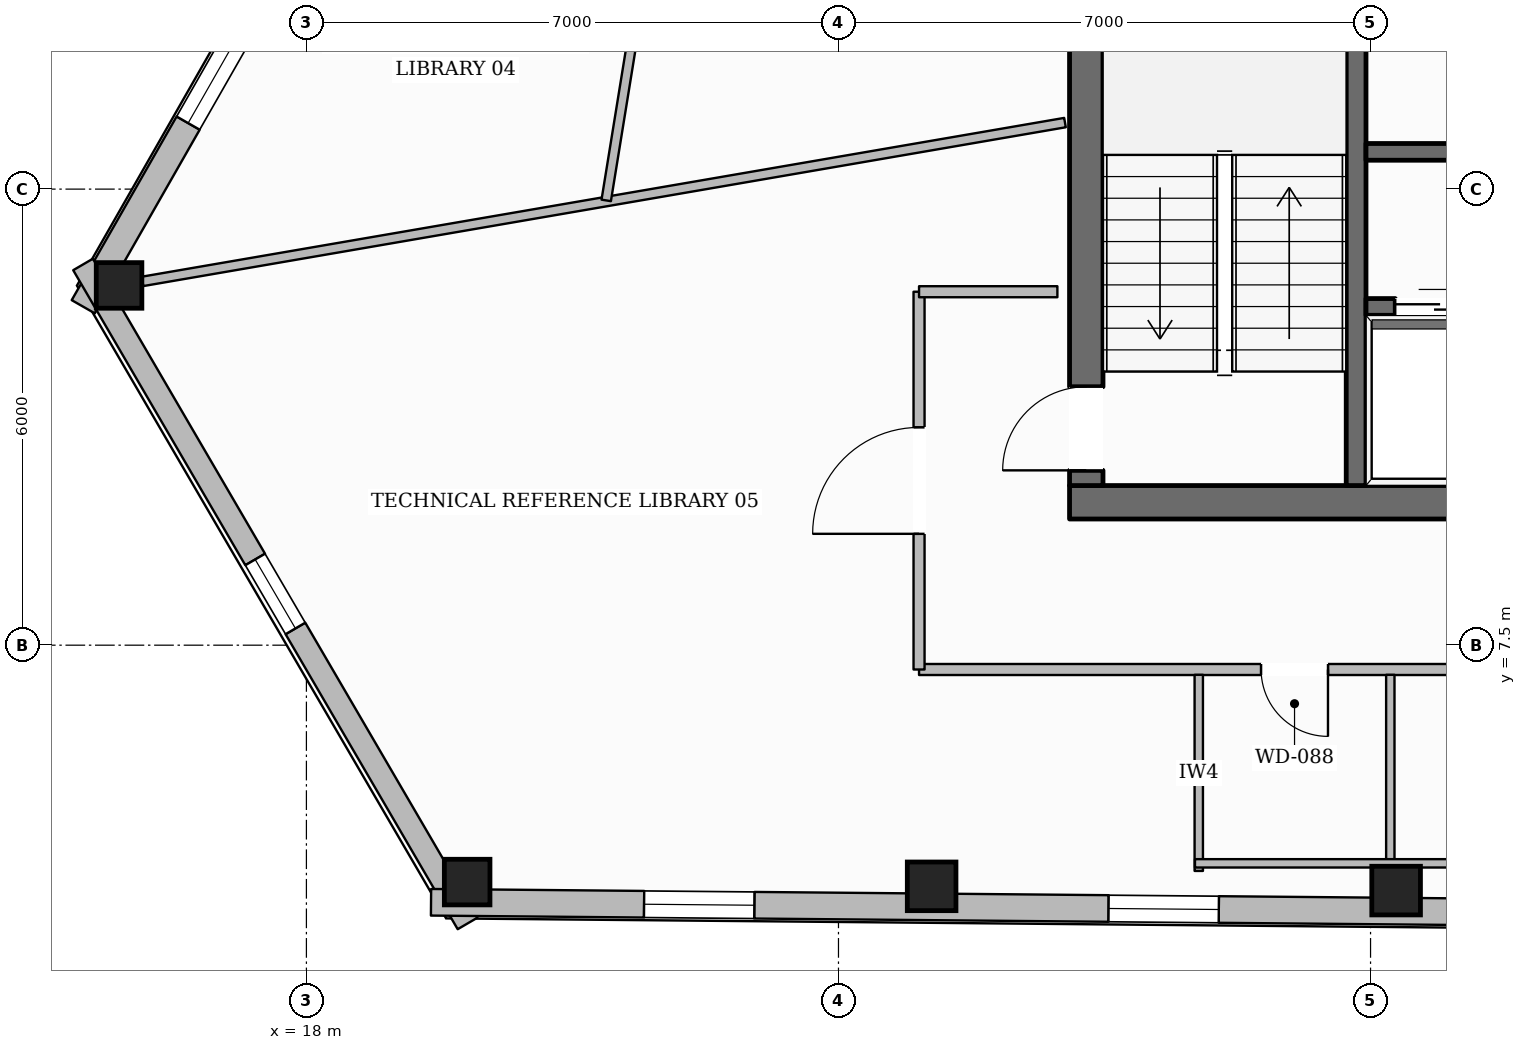
"""IFC4 building model, lengths in metres.
Left out: names, types, materials, properties, quantities, classifications, styles, units other than length and angle.
Written with IfcOpenShell. Run it as: python <this file> out.ifc"""

import sys

from ifc_helpers import new_model, si_unit, direction, frame, frame_2d, origin, origin_2d, place, context, subcontext, project, spatial, rectangle, hollow_rectangle, extrude, element, fill, save


model = new_model("IFC4")
c1 = context("Model", 3, precision=1e-05, world=origin(), true_north=direction((0.0, 1.0)))
c2 = subcontext(c1, "Body", "Model", "MODEL_VIEW")
j1 = project(units=[si_unit("LENGTHUNIT", "METRE"), si_unit("PLANEANGLEUNIT", "RADIAN")], contexts=[c1])
p1 = place(None, origin())
s1 = spatial("IfcSite", under=j1, at=p1, CompositionType="ELEMENT")
p2 = place(p1, origin())
s2 = spatial("IfcBuilding", under=s1, at=p2, CompositionType="ELEMENT")
p3 = place(p2, frame((0.0, 0.0, 188.1)))
s3 = spatial("IfcBuildingStorey", under=s2, at=p3, CompositionType="ELEMENT", Elevation=188.1)
p4 = place(p3, frame((28.04, 9.38, 0.0), z_axis=(0.0, 0.0, 1.0), x_axis=(1.0, 0.0, 0.0)))
e1 = element("IfcWall", 1, at=p4, inside=s3, PredefinedType="SOLIDWALL", context=c2, shape_type="SweptSolid", body=[
    extrude(rectangle(XDim=19.92, YDim=0.44, at=frame_2d((9.96, 0.0))), origin(), (0.0, 0.0, 1.0), 3.6),
])
p5 = place(p4, frame((10.46, 0.0, 0.0)))
e2 = element("IfcOpeningElement", 2, at=p5, cuts=e1, PredefinedType="OPENING", context=c2, shape_type="SweptSolid", body=[
    extrude(rectangle(XDim=1.4, YDim=2.2, at=frame_2d((0.7, 1.1))), frame((0.0, 0.23, 0.0), z_axis=(0.0, -1.0, 0.0), x_axis=(1.0, 0.0, 0.0)), (0.0, 0.0, 1.0), 0.46),
])
p6 = place(p3, frame((28.26, 9.6, 0.0), z_axis=(0.0, 0.0, 1.0), x_axis=(0.0, 1.0, 0.0)))
e3 = element("IfcWall", 3, at=p6, inside=s3, PredefinedType="SOLIDWALL", context=c2, shape_type="SweptSolid", body=[
    extrude(rectangle(XDim=13.0, YDim=0.44, at=frame_2d((6.5, 0.0))), origin(), (0.0, 0.0, 1.0), 3.6),
])
p7 = place(p6, frame((0.2, 0.0, 0.0)))
e4 = element("IfcOpeningElement", 4, at=p7, cuts=e3, PredefinedType="OPENING", context=c2, shape_type="SweptSolid", body=[
    extrude(rectangle(XDim=1.1, YDim=2.15, at=frame_2d((0.55, 1.075))), frame((0.0, 0.23, 0.0), z_axis=(0.0, -1.0, 0.0), x_axis=(1.0, 0.0, 0.0)), (0.0, 0.0, 1.0), 0.46),
])
p8 = place(p6, frame((8.4, 0.0, 0.0)))
e5 = element("IfcOpeningElement", 5, at=p8, cuts=e3, PredefinedType="OPENING", context=c2, shape_type="SweptSolid", body=[
    extrude(rectangle(XDim=0.9, YDim=2.1, at=frame_2d((0.45, 1.05))), frame((0.0, 0.23, 0.0), z_axis=(0.0, -1.0, 0.0), x_axis=(1.0, 0.0, 0.0)), (0.0, 0.0, 1.0), 0.46),
])
p9 = place(p3, frame((31.81, 9.6, 0.0), z_axis=(0.0, 0.0, 1.0), x_axis=(0.0, 1.0, 0.0)))
e6 = element("IfcWall", 6, at=p9, inside=s3, PredefinedType="SHEAR", context=c2, shape_type="SweptSolid", body=[
    extrude(rectangle(XDim=13.0, YDim=0.26, at=frame_2d((6.5, 0.0))), origin(), (0.0, 0.0, 1.0), 3.6),
])
p10 = place(p9, frame((10.925, 0.0, 0.0)))
e7 = element("IfcOpeningElement", 7, at=p10, cuts=e6, PredefinedType="OPENING", context=c2, shape_type="SweptSolid", body=[
    extrude(rectangle(XDim=1.25, YDim=2.25, at=frame_2d((0.625, 1.125))), frame((0.0, 0.14, 0.0), z_axis=(0.0, -1.0, 0.0), x_axis=(1.0, 0.0, 0.0)), (0.0, 0.0, 1.0), 0.28),
])
p11 = place(p3, frame((31.94, 13.99, 0.0), z_axis=(0.0, 0.0, 1.0), x_axis=(1.0, 0.0, 0.0)))
e8 = element("IfcWall", 8, at=p11, inside=s3, PredefinedType="SOLIDWALL", context=c2, shape_type="SweptSolid", body=[
    extrude(rectangle(XDim=12.12, YDim=0.22, at=frame_2d((6.06, 0.0))), origin(), (0.0, 0.0, 1.0), 3.6),
])
p12 = place(p11, frame((3.11, 0.0, 0.0)))
e9 = element("IfcOpeningElement", 9, at=p12, cuts=e8, PredefinedType="OPENING", context=c2, shape_type="SweptSolid", body=[
    extrude(rectangle(XDim=0.9, YDim=2.1, at=frame_2d((0.45, 1.05))), frame((0.0, 0.12, 0.0), z_axis=(0.0, -1.0, 0.0), x_axis=(1.0, 0.0, 0.0)), (0.0, 0.0, 1.0), 0.24),
])
p13 = place(p11, frame((9.21, 0.0, 0.0)))
e10 = element("IfcOpeningElement", 10, at=p13, cuts=e8, PredefinedType="OPENING", context=c2, shape_type="SweptSolid", body=[
    extrude(rectangle(XDim=0.9, YDim=2.1, at=frame_2d((0.45, 1.05))), frame((0.0, 0.12, 0.0), z_axis=(0.0, -1.0, 0.0), x_axis=(1.0, 0.0, 0.0)), (0.0, 0.0, 1.0), 0.24),
])
p14 = place(p3, frame((31.94, 11.95, 0.0), z_axis=(0.0, 0.0, 1.0), x_axis=(1.0, 0.0, 0.0)))
e11 = element("IfcWall", 11, at=p14, inside=s3, PredefinedType="SOLIDWALL", context=c2, shape_type="SweptSolid", body=[
    extrude(rectangle(XDim=6.19, YDim=0.22, at=frame_2d((3.095, 0.0))), origin(), (0.0, 0.0, 1.0), 3.6),
])
p15 = place(p14, frame((0.385, 0.0, 0.0)))
e12 = element("IfcOpeningElement", 12, at=p15, cuts=e11, PredefinedType="OPENING", context=c2, shape_type="SweptSolid", body=[
    extrude(rectangle(XDim=1.1, YDim=2.2, at=frame_2d((0.55, 1.1))), frame((0.0, 0.12, 0.0), z_axis=(0.0, -1.0, 0.0), x_axis=(1.0, 0.0, 0.0)), (0.0, 0.0, 1.0), 0.24),
])
p16 = place(p14, frame((2.435, 0.0, 0.0)))
e13 = element("IfcOpeningElement", 13, at=p16, cuts=e11, PredefinedType="OPENING", context=c2, shape_type="SweptSolid", body=[
    extrude(rectangle(XDim=1.1, YDim=2.2, at=frame_2d((0.55, 1.1))), frame((0.0, 0.12, 0.0), z_axis=(0.0, -1.0, 0.0), x_axis=(1.0, 0.0, 0.0)), (0.0, 0.0, 1.0), 0.24),
])
p17 = place(p14, frame((4.485, 0.0, 0.0)))
e14 = element("IfcOpeningElement", 14, at=p17, cuts=e11, PredefinedType="OPENING", context=c2, shape_type="SweptSolid", body=[
    extrude(rectangle(XDim=1.1, YDim=2.2, at=frame_2d((0.55, 1.1))), frame((0.0, 0.12, 0.0), z_axis=(0.0, -1.0, 0.0), x_axis=(1.0, 0.0, 0.0)), (0.0, 0.0, 1.0), 0.24),
])
for number, where, z_axis, x_axis in (
    (15, (15.535, 12.233, 0.0), (0.0, 0.0, 1.0), (1.0, 0.0, 0.0)),
    (16, (20.115, 4.383, 0.0), (0.0, 0.0, 1.0), (1.0, 0.0, 0.0)),
):
    element("IfcColumn", number, at=place(p3, frame(where, z_axis=z_axis, x_axis=x_axis)), inside=s3, PredefinedType="COLUMN", context=c2, shape_type="SweptSolid", body=[
        extrude(hollow_rectangle(XDim=0.6, YDim=0.6, WallThickness=0.028, at=origin_2d()), origin(), (0.0, 0.0, 1.0), 3.6),
    ])
for number, where, z_axis, x_axis in (
    (17, (26.226, 4.327, 0.0), (0.0, 0.0, 1.0), (1.0, 0.0, 0.0)),
    (18, (32.336, 4.271, 0.0), (0.0, 0.0, 1.0), (1.0, 0.0, 0.0)),
):
    element("IfcColumn", number, at=place(p3, frame(where, z_axis=z_axis, x_axis=x_axis)), inside=s3, PredefinedType="COLUMN", context=c2, shape_type="SweptSolid", body=[
        extrude(hollow_rectangle(XDim=0.64, YDim=0.64, WallThickness=0.028, at=origin_2d()), origin(), (0.0, 0.0, 1.0), 3.6),
    ])
p18 = place(p3, frame((15.064, 11.953, 0.0), z_axis=(0.0, 0.0, 1.0), x_axis=(0.495993114815, 0.86832645362, 0.0)))
e19 = element("IfcWall", 19, at=p18, inside=s3, PredefinedType="STANDARD", context=c2, shape_type="SweptSolid", body=[
    extrude(rectangle(XDim=37.324, YDim=0.35, at=frame_2d((18.662, 0.0))), origin(), (0.0, 0.0, 1.0), 3.132),
])
p19 = place(p18, frame((33.087, 0.0, 0.65)))
e20 = element("IfcOpeningElement", 20, at=p19, cuts=e19, PredefinedType="OPENING", context=c2, shape_type="SweptSolid", body=[
    extrude(rectangle(XDim=1.45, YDim=1.75, at=frame_2d((0.725, 0.875))), frame((0.0, 0.185, 0.0), z_axis=(0.0, -1.0, 0.0), x_axis=(1.0, 0.0, 0.0)), (0.0, 0.0, 1.0), 0.37),
])
p20 = place(p18, frame((27.026, 0.0, 0.65)))
e21 = element("IfcOpeningElement", 21, at=p20, cuts=e19, PredefinedType="OPENING", context=c2, shape_type="SweptSolid", body=[
    extrude(rectangle(XDim=1.45, YDim=1.75, at=frame_2d((0.725, 0.875))), frame((0.0, 0.185, 0.0), z_axis=(0.0, -1.0, 0.0), x_axis=(1.0, 0.0, 0.0)), (0.0, 0.0, 1.0), 0.37),
])
p21 = place(p18, frame((14.904, 0.0, 0.65)))
e22 = element("IfcOpeningElement", 22, at=p21, cuts=e19, PredefinedType="OPENING", context=c2, shape_type="SweptSolid", body=[
    extrude(rectangle(XDim=1.45, YDim=1.75, at=frame_2d((0.725, 0.875))), frame((0.0, 0.185, 0.0), z_axis=(0.0, -1.0, 0.0), x_axis=(1.0, 0.0, 0.0)), (0.0, 0.0, 1.0), 0.37),
])
p22 = place(p18, frame((8.844, 0.0, 0.65)))
e23 = element("IfcOpeningElement", 23, at=p22, cuts=e19, PredefinedType="OPENING", context=c2, shape_type="SweptSolid", body=[
    extrude(rectangle(XDim=1.45, YDim=1.75, at=frame_2d((0.725, 0.875))), frame((0.0, 0.185, 0.0), z_axis=(0.0, -1.0, 0.0), x_axis=(1.0, 0.0, 0.0)), (0.0, 0.0, 1.0), 0.37),
])
p23 = place(p18, frame((2.782, 0.0, 0.65)))
e24 = element("IfcOpeningElement", 24, at=p23, cuts=e19, PredefinedType="OPENING", context=c2, shape_type="SweptSolid", body=[
    extrude(rectangle(XDim=1.45, YDim=1.75, at=frame_2d((0.725, 0.875))), frame((0.0, 0.185, 0.0), z_axis=(0.0, -1.0, 0.0), x_axis=(1.0, 0.0, 0.0)), (0.0, 0.0, 1.0), 0.37),
])
p24 = place(p3, frame((20.12, 3.839, 0.0), z_axis=(0.0, 0.0, 1.0), x_axis=(-0.503937564299, 0.863740083178, 0.0)))
e25 = element("IfcWall", 25, at=p24, inside=s3, PredefinedType="STANDARD", context=c2, shape_type="SweptSolid", body=[
    extrude(rectangle(XDim=10.038, YDim=0.3, at=frame_2d((5.019, 0.0))), origin(), (0.0, 0.0, 1.0), 3.132),
])
p25 = place(p24, frame((4.494, 0.0, 0.65)))
e26 = element("IfcOpeningElement", 26, at=p25, cuts=e25, PredefinedType="OPENING", context=c2, shape_type="SweptSolid", body=[
    extrude(rectangle(XDim=1.05, YDim=1.7, at=frame_2d((0.525, 0.85))), frame((0.0, 0.16, 0.0), z_axis=(0.0, -1.0, 0.0), x_axis=(1.0, 0.0, 0.0)), (0.0, 0.0, 1.0), 0.32),
])
p26 = place(p3, frame((57.259, 3.773, 0.0), z_axis=(0.0, 0.0, 1.0), x_axis=(-0.999958016909, 0.009163210113, 0.0)))
e27 = element("IfcWall", 27, at=p26, inside=s3, PredefinedType="STANDARD", context=c2, shape_type="SweptSolid", body=[
    extrude(rectangle(XDim=37.621, YDim=0.35, at=frame_2d((18.81, 0.0))), origin(), (0.0, 0.0, 1.0), 3.132),
])
p27 = place(p26, frame((33.368, 0.0, 0.65)))
e28 = element("IfcOpeningElement", 28, at=p27, cuts=e27, PredefinedType="OPENING", context=c2, shape_type="SweptSolid", body=[
    extrude(rectangle(XDim=1.45, YDim=1.75, at=frame_2d((0.725, 0.875))), frame((0.0, 0.185, 0.0), z_axis=(0.0, -1.0, 0.0), x_axis=(1.0, 0.0, 0.0)), (0.0, 0.0, 1.0), 0.37),
])
p28 = place(p26, frame((27.257, 0.0, 0.65)))
e29 = element("IfcOpeningElement", 29, at=p28, cuts=e27, PredefinedType="OPENING", context=c2, shape_type="SweptSolid", body=[
    extrude(rectangle(XDim=1.45, YDim=1.75, at=frame_2d((0.725, 0.875))), frame((0.0, 0.185, 0.0), z_axis=(0.0, -1.0, 0.0), x_axis=(1.0, 0.0, 0.0)), (0.0, 0.0, 1.0), 0.37),
])
p29 = place(p26, frame((15.034, 0.0, 0.65)))
e30 = element("IfcOpeningElement", 30, at=p29, cuts=e27, PredefinedType="OPENING", context=c2, shape_type="SweptSolid", body=[
    extrude(rectangle(XDim=1.45, YDim=1.75, at=frame_2d((0.725, 0.875))), frame((0.0, 0.185, 0.0), z_axis=(0.0, -1.0, 0.0), x_axis=(1.0, 0.0, 0.0)), (0.0, 0.0, 1.0), 0.37),
])
p30 = place(p26, frame((8.923, 0.0, 0.65)))
e31 = element("IfcOpeningElement", 31, at=p30, cuts=e27, PredefinedType="OPENING", context=c2, shape_type="SweptSolid", body=[
    extrude(rectangle(XDim=1.45, YDim=1.75, at=frame_2d((0.725, 0.875))), frame((0.0, 0.185, 0.0), z_axis=(0.0, -1.0, 0.0), x_axis=(1.0, 0.0, 0.0)), (0.0, 0.0, 1.0), 0.37),
])
p31 = place(p26, frame((2.812, 0.0, 0.65)))
e32 = element("IfcOpeningElement", 32, at=p31, cuts=e27, PredefinedType="OPENING", context=c2, shape_type="SweptSolid", body=[
    extrude(rectangle(XDim=1.45, YDim=1.75, at=frame_2d((0.725, 0.875))), frame((0.0, 0.185, 0.0), z_axis=(0.0, -1.0, 0.0), x_axis=(1.0, 0.0, 0.0)), (0.0, 0.0, 1.0), 0.37),
])
p32 = place(p3, frame((49.94, 7.18, 0.0), z_axis=(0.0, 0.0, 1.0), x_axis=(-1.0, 0.0, 0.0)))
e33 = element("IfcWall", 33, at=p32, inside=s3, PredefinedType="PARTITIONING", context=c2, shape_type="SweptSolid", body=[
    extrude(rectangle(XDim=23.88, YDim=0.145, at=frame_2d((11.94, 0.0))), origin(), (0.0, 0.0, 1.0), 3.6),
])
p33 = place(p32, frame((18.5, 0.0, 0.0)))
e34 = element("IfcOpeningElement", 34, at=p33, cuts=e33, PredefinedType="OPENING", context=c2, shape_type="SweptSolid", body=[
    extrude(rectangle(XDim=0.88, YDim=2.1, at=frame_2d((0.44, 1.05))), frame((0.0, 0.083, 0.0), z_axis=(0.0, -1.0, 0.0), x_axis=(1.0, 0.0, 0.0)), (0.0, 0.0, 1.0), 0.165),
])
p34 = place(p32, frame((15.98, 0.0, 0.0)))
e35 = element("IfcOpeningElement", 35, at=p34, cuts=e33, PredefinedType="OPENING", context=c2, shape_type="SweptSolid", body=[
    extrude(rectangle(XDim=0.88, YDim=2.1, at=frame_2d((0.44, 1.05))), frame((0.0, 0.083, 0.0), z_axis=(0.0, -1.0, 0.0), x_axis=(1.0, 0.0, 0.0)), (0.0, 0.0, 1.0), 0.165),
])
p35 = place(p32, frame((13.52, 0.0, 0.0)))
e36 = element("IfcOpeningElement", 36, at=p35, cuts=e33, PredefinedType="OPENING", context=c2, shape_type="SweptSolid", body=[
    extrude(rectangle(XDim=0.96, YDim=2.1, at=frame_2d((0.48, 1.05))), frame((0.0, 0.083, 0.0), z_axis=(0.0, -1.0, 0.0), x_axis=(1.0, 0.0, 0.0)), (0.0, 0.0, 1.0), 0.165),
])
p36 = place(p32, frame((9.446, 0.0, 0.0)))
e37 = element("IfcOpeningElement", 37, at=p36, cuts=e33, PredefinedType="OPENING", context=c2, shape_type="SweptSolid", body=[
    extrude(rectangle(XDim=0.98, YDim=2.15, at=frame_2d((0.49, 1.075))), frame((0.0, 0.083, 0.0), z_axis=(0.0, -1.0, 0.0), x_axis=(1.0, 0.0, 0.0)), (0.0, 0.0, 1.0), 0.165),
])
p37 = place(p3, frame((26.06, 7.18, 0.0), z_axis=(0.0, 0.0, 1.0), x_axis=(0.0, 1.0, 0.0)))
e38 = element("IfcWall", 38, at=p37, inside=s3, PredefinedType="PARTITIONING", context=c2, shape_type="SweptSolid", body=[
    extrude(rectangle(XDim=4.97, YDim=0.145, at=frame_2d((2.485, 0.0))), origin(), (0.0, 0.0, 1.0), 3.6),
])
p38 = place(p37, frame((1.785, 0.0, 0.0)))
e39 = element("IfcOpeningElement", 39, at=p38, cuts=e38, PredefinedType="OPENING", context=c2, shape_type="SweptSolid", body=[
    extrude(rectangle(XDim=1.4, YDim=2.2, at=frame_2d((0.7, 1.1))), frame((0.0, 0.083, 0.0), z_axis=(0.0, -1.0, 0.0), x_axis=(1.0, 0.0, 0.0)), (0.0, 0.0, 1.0), 0.165),
])
p39 = place(p3, frame((26.06, 12.15, 0.0), z_axis=(0.0, 0.0, 1.0), x_axis=(1.0, 0.0, 0.0)))
e40 = element("IfcWall", 40, at=p39, inside=s3, PredefinedType="PARTITIONING", context=c2, shape_type="SweptSolid", body=[
    extrude(rectangle(XDim=1.82, YDim=0.145, at=frame_2d((0.91, 0.0))), origin(), (0.0, 0.0, 1.0), 3.141),
])
p40 = place(p3, frame((29.74, 4.53, 0.0), z_axis=(0.0, 0.0, 1.0), x_axis=(0.0, 1.0, 0.0)))
e41 = element("IfcWall", 41, at=p40, inside=s3, PredefinedType="PLUMBINGWALL", context=c2, shape_type="SweptSolid", body=[
    extrude(rectangle(XDim=2.58, YDim=0.11, at=frame_2d((1.29, 0.0))), origin(), (0.0, 0.0, 1.0), 3.6),
])
p41 = place(p3, frame((32.26, 4.53, 0.0), z_axis=(0.0, 0.0, 1.0), x_axis=(0.0, 1.0, 0.0)))
e42 = element("IfcWall", 42, at=p41, inside=s3, PredefinedType="PLUMBINGWALL", context=c2, shape_type="SweptSolid", body=[
    extrude(rectangle(XDim=2.58, YDim=0.11, at=frame_2d((1.29, 0.0))), origin(), (0.0, 0.0, 1.0), 3.141),
])
p42 = place(p3, frame((29.69, 4.63, 0.0), z_axis=(0.0, 0.0, 1.0), x_axis=(1.0, 0.0, 0.0)))
e43 = element("IfcWall", 43, at=p42, inside=s3, PredefinedType="PLUMBINGWALL", context=c2, shape_type="SweptSolid", body=[
    extrude(rectangle(XDim=7.46, YDim=0.11, at=frame_2d((3.73, 0.0))), origin(), (0.0, 0.0, 1.0), 3.6),
])
p43 = place(p3, frame((27.98, 14.375, 0.0), z_axis=(0.0, 0.0, 1.0), x_axis=(-0.9855033492, -0.169655971646, 0.0)))
e44 = element("IfcWall", 44, at=p43, inside=s3, PredefinedType="PARTITIONING", context=c2, shape_type="SweptSolid", body=[
    extrude(rectangle(XDim=12.315, YDim=0.125, at=frame_2d((6.158, 0.0))), origin(), (0.0, 0.0, 1.0), 3.141),
])
p44 = place(p3, frame((24.273, 27.694, 0.0), z_axis=(0.0, 0.0, 1.0), x_axis=(-0.160245052552, -0.987077263, 0.0)))
e45 = element("IfcWall", 45, at=p44, inside=s3, PredefinedType="PARTITIONING", context=c2, shape_type="SweptSolid", body=[
    extrude(rectangle(XDim=14.53, YDim=0.125, at=frame_2d((7.265, 0.0))), origin(), (0.0, 0.0, 1.0), 3.135),
])
p45 = place(p44, frame((6.665, 0.0, 0.0)))
e46 = element("IfcOpeningElement", 46, at=p45, cuts=e45, PredefinedType="OPENING", context=c2, shape_type="SweptSolid", body=[
    extrude(rectangle(XDim=0.98, YDim=2.15, at=frame_2d((0.49, 1.075))), frame((0.0, 0.073, 0.0), z_axis=(0.0, -1.0, 0.0), x_axis=(1.0, 0.0, 0.0)), (0.0, 0.0, 1.0), 0.145),
])
p46 = place(p23, origin())
e47 = element("IfcWindow", 47, at=p46, inside=s3, PartitioningType="SINGLE_PANEL", PredefinedType="WINDOW", context=c2, shape_type="SweptSolid", body=[
    extrude(rectangle(XDim=1.45, YDim=1.75, at=frame_2d((0.725, 0.875))), frame((0.0, 0.03, 0.0), z_axis=(0.0, -1.0, 0.0), x_axis=(1.0, 0.0, 0.0)), (0.0, 0.0, 1.0), 0.06),
])
fill(e24, e47)
p47 = place(p27, origin())
e48 = element("IfcWindow", 48, at=p47, inside=s3, PartitioningType="SINGLE_PANEL", PredefinedType="WINDOW", context=c2, shape_type="SweptSolid", body=[
    extrude(rectangle(XDim=1.45, YDim=1.75, at=frame_2d((0.725, 0.875))), frame((0.0, 0.03, 0.0), z_axis=(0.0, -1.0, 0.0), x_axis=(1.0, 0.0, 0.0)), (0.0, 0.0, 1.0), 0.06),
])
fill(e28, e48)
p48 = place(p28, origin())
e49 = element("IfcWindow", 49, at=p48, inside=s3, PartitioningType="SINGLE_PANEL", PredefinedType="WINDOW", context=c2, shape_type="SweptSolid", body=[
    extrude(rectangle(XDim=1.45, YDim=1.75, at=frame_2d((0.725, 0.875))), frame((0.0, 0.03, 0.0), z_axis=(0.0, -1.0, 0.0), x_axis=(1.0, 0.0, 0.0)), (0.0, 0.0, 1.0), 0.06),
])
fill(e29, e49)
p49 = place(p25, origin())
e50 = element("IfcWindow", 50, at=p49, inside=s3, PartitioningType="SINGLE_PANEL", PredefinedType="WINDOW", context=c2, shape_type="SweptSolid", body=[
    extrude(rectangle(XDim=1.05, YDim=1.7, at=frame_2d((0.525, 0.85))), frame((0.0, 0.03, 0.0), z_axis=(0.0, -1.0, 0.0), x_axis=(1.0, 0.0, 0.0)), (0.0, 0.0, 1.0), 0.06),
])
fill(e26, e50)
p50 = place(p7, origin())
e51 = element("IfcDoor", 51, at=p50, inside=s3, OperationType="SINGLE_SWING_LEFT", PredefinedType="DOOR", context=c2, shape_type="SweptSolid", body=[
    extrude(rectangle(XDim=1.1, YDim=2.15, at=frame_2d((0.55, 1.075))), frame((0.0, 0.025, 0.0), z_axis=(0.0, -1.0, 0.0), x_axis=(1.0, 0.0, 0.0)), (0.0, 0.0, 1.0), 0.05),
])
fill(e4, e51)
p51 = place(p15, origin())
e52 = element("IfcDoor", 52, at=p51, inside=s3, OperationType="DOUBLE_DOOR_SLIDING", PredefinedType="DOOR", context=c2, shape_type="SweptSolid", body=[
    extrude(rectangle(XDim=1.1, YDim=2.2, at=frame_2d((0.55, 1.1))), frame((0.0, 0.025, 0.0), z_axis=(0.0, -1.0, 0.0), x_axis=(1.0, 0.0, 0.0)), (0.0, 0.0, 1.0), 0.05),
])
fill(e12, e52)
p52 = place(p33, origin())
e53 = element("IfcDoor", 53, at=p52, inside=s3, OperationType="SINGLE_SWING_LEFT", PredefinedType="DOOR", context=c2, shape_type="SweptSolid", body=[
    extrude(rectangle(XDim=0.88, YDim=2.1, at=frame_2d((0.44, 1.05))), frame((0.0, 0.025, 0.0), z_axis=(0.0, -1.0, 0.0), x_axis=(1.0, 0.0, 0.0)), (0.0, 0.0, 1.0), 0.05),
])
fill(e34, e53)
p53 = place(p38, origin())
e54 = element("IfcDoor", 54, at=p53, inside=s3, OperationType="SINGLE_SWING_LEFT", PredefinedType="DOOR", context=c2, shape_type="SweptSolid", body=[
    extrude(rectangle(XDim=1.4, YDim=2.2, at=frame_2d((0.7, 1.1))), frame((0.0, 0.025, 0.0), z_axis=(0.0, -1.0, 0.0), x_axis=(1.0, 0.0, 0.0)), (0.0, 0.0, 1.0), 0.05),
])
fill(e39, e54)
save(model, sys.argv[1])
